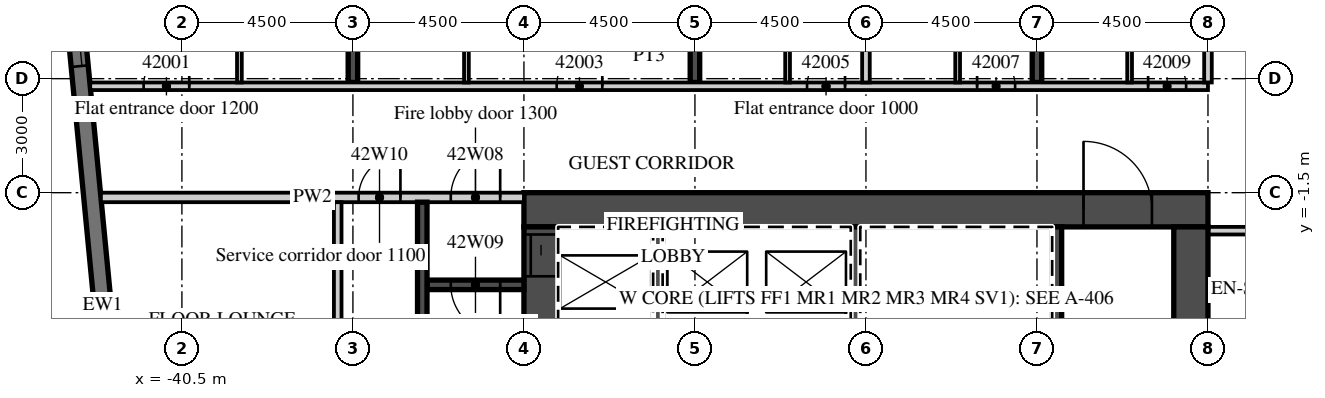
"""IFC4 building model, lengths in metres.
Left out: names, types, materials, properties, quantities, classifications, styles, units other than length and angle.
Written with IfcOpenShell. Run it as: python <this file> out.ifc"""

import sys

from ifc_helpers import new_model, si_unit, direction, frame, frame_2d, origin, place, context, subcontext, project, spatial, rectangle, extrude, element, fill, save


model = new_model("IFC4")
c1 = context("Model", 3, precision=1e-05, world=origin(), true_north=direction((0.0, 1.0)))
c2 = subcontext(c1, "Body", "Model", "MODEL_VIEW")
j1 = project(units=[si_unit("LENGTHUNIT", "METRE"), si_unit("PLANEANGLEUNIT", "RADIAN")], contexts=[c1])
p1 = place(None, origin())
s1 = spatial("IfcSite", under=j1, at=p1, CompositionType="ELEMENT")
p2 = place(p1, origin())
s2 = spatial("IfcBuilding", under=s1, at=p2, CompositionType="ELEMENT")
p3 = place(p2, frame((0.0, 0.0, 180.1)))
s3 = spatial("IfcBuildingStorey", under=s2, at=p3, CompositionType="ELEMENT", Elevation=180.1)
p4 = place(p3, frame((-36.0, 1.4, 0.0), z_axis=(0.0, 0.0, 1.0), x_axis=(0.0, 1.0, 0.0)))
e1 = element("IfcWall", 1, at=p4, inside=s3, PredefinedType="SHEAR", context=c2, shape_type="SweptSolid", body=[
    extrude(rectangle(XDim=15.401, YDim=0.25, at=frame_2d((7.701, 0.0))), origin(), (0.0, 0.0, 1.0), 3.3),
])
p5 = place(p3, frame((-27.0, 1.4, 0.0), z_axis=(0.0, 0.0, 1.0), x_axis=(0.0, 1.0, 0.0)))
e2 = element("IfcWall", 2, at=p5, inside=s3, PredefinedType="SHEAR", context=c2, shape_type="SweptSolid", body=[
    extrude(rectangle(XDim=16.268, YDim=0.25, at=frame_2d((8.134, 0.0))), origin(), (0.0, 0.0, 1.0), 3.3),
])
p6 = place(p3, frame((-18.0, 1.4, 0.0), z_axis=(0.0, 0.0, 1.0), x_axis=(0.0, 1.0, 0.0)))
e3 = element("IfcWall", 3, at=p6, inside=s3, PredefinedType="SHEAR", context=c2, shape_type="SweptSolid", body=[
    extrude(rectangle(XDim=17.134, YDim=0.25, at=frame_2d((8.567, 0.0))), origin(), (0.0, 0.0, 1.0), 3.3),
])
p7 = place(p3, frame((-44.214, 12.466, 0.0), z_axis=(0.0, 0.0, 1.0), x_axis=(0.095847314626, -0.995396047952, 0.0)))
e4 = element("IfcWall", 4, at=p7, inside=s3, PredefinedType="SOLIDWALL", context=c2, shape_type="SweptSolid", body=[
    extrude(rectangle(XDim=34.0, YDim=0.45, at=frame_2d((17.0, 0.0))), origin(), (0.0, 0.0, 1.0), 3.02),
])
p8 = place(p7, frame((2.865, 0.0, 0.45)))
e5 = element("IfcOpeningElement", 5, at=p8, cuts=e4, PredefinedType="OPENING", context=c2, shape_type="SweptSolid", body=[
    extrude(rectangle(XDim=3.3, YDim=2.25, at=frame_2d((1.65, 1.125))), frame((0.0, 0.235, 0.0), z_axis=(0.0, -1.0, 0.0), x_axis=(1.0, 0.0, 0.0)), (0.0, 0.0, 1.0), 0.47),
])
p9 = place(p7, frame((7.386, 0.0, 0.45)))
e6 = element("IfcOpeningElement", 6, at=p9, cuts=e4, PredefinedType="OPENING", context=c2, shape_type="SweptSolid", body=[
    extrude(rectangle(XDim=3.3, YDim=2.25, at=frame_2d((1.65, 1.125))), frame((0.0, 0.235, 0.0), z_axis=(0.0, -1.0, 0.0), x_axis=(1.0, 0.0, 0.0)), (0.0, 0.0, 1.0), 0.47),
])
p10 = place(p3, frame((-42.913, 1.3, 0.0), z_axis=(0.0, 0.0, 1.0), x_axis=(1.0, 0.0, 0.0)))
e7 = element("IfcWall", 7, at=p10, inside=s3, PredefinedType="PARTITIONING", context=c2, shape_type="SweptSolid", body=[
    extrude(rectangle(XDim=29.413, YDim=0.2, at=frame_2d((14.707, 0.0))), origin(), (0.0, 0.0, 1.0), 3.02),
])
p11 = place(p10, frame((1.406, 0.0, 0.0)))
e8 = element("IfcOpeningElement", 8, at=p11, cuts=e7, PredefinedType="OPENING", context=c2, shape_type="SweptSolid", body=[
    extrude(rectangle(XDim=1.2, YDim=2.1, at=frame_2d((0.6, 1.05))), frame((0.0, 0.11, 0.0), z_axis=(0.0, -1.0, 0.0), x_axis=(1.0, 0.0, 0.0)), (0.0, 0.0, 1.0), 0.22),
])
p12 = place(p10, frame((12.275, 0.0, 0.0)))
e9 = element("IfcOpeningElement", 9, at=p12, cuts=e7, PredefinedType="OPENING", context=c2, shape_type="SweptSolid", body=[
    extrude(rectangle(XDim=1.2, YDim=2.1, at=frame_2d((0.6, 1.05))), frame((0.0, 0.11, 0.0), z_axis=(0.0, -1.0, 0.0), x_axis=(1.0, 0.0, 0.0)), (0.0, 0.0, 1.0), 0.22),
])
p13 = place(p10, frame((18.863, 0.0, 0.0)))
e10 = element("IfcOpeningElement", 10, at=p13, cuts=e7, PredefinedType="OPENING", context=c2, shape_type="SweptSolid", body=[
    extrude(rectangle(XDim=1.0, YDim=2.1, at=frame_2d((0.5, 1.05))), frame((0.0, 0.11, 0.0), z_axis=(0.0, -1.0, 0.0), x_axis=(1.0, 0.0, 0.0)), (0.0, 0.0, 1.0), 0.22),
])
p14 = place(p10, frame((23.338, 0.0, 0.0)))
e11 = element("IfcOpeningElement", 11, at=p14, cuts=e7, PredefinedType="OPENING", context=c2, shape_type="SweptSolid", body=[
    extrude(rectangle(XDim=1.0, YDim=2.1, at=frame_2d((0.5, 1.05))), frame((0.0, 0.11, 0.0), z_axis=(0.0, -1.0, 0.0), x_axis=(1.0, 0.0, 0.0)), (0.0, 0.0, 1.0), 0.22),
])
p15 = place(p10, frame((27.838, 0.0, 0.0)))
e12 = element("IfcOpeningElement", 12, at=p15, cuts=e7, PredefinedType="OPENING", context=c2, shape_type="SweptSolid", body=[
    extrude(rectangle(XDim=1.0, YDim=2.1, at=frame_2d((0.5, 1.05))), frame((0.0, 0.11, 0.0), z_axis=(0.0, -1.0, 0.0), x_axis=(1.0, 0.0, 0.0)), (0.0, 0.0, 1.0), 0.22),
])
p16 = place(p3, frame((-38.987, 1.4, 0.0), z_axis=(0.0, 0.0, 1.0), x_axis=(0.0, 1.0, 0.0)))
e13 = element("IfcWall", 13, at=p16, inside=s3, PredefinedType="PARTITIONING", context=c2, shape_type="SweptSolid", body=[
    extrude(rectangle(XDim=4.028, YDim=0.125, at=frame_2d((2.014, 0.0))), origin(), (0.0, 0.0, 1.0), 3.02),
])
p17 = place(p16, frame((2.45, 0.0, 0.0)))
e14 = element("IfcOpeningElement", 14, at=p17, cuts=e13, PredefinedType="OPENING", context=c2, shape_type="SweptSolid", body=[
    extrude(rectangle(XDim=0.9, YDim=2.1, at=frame_2d((0.45, 1.05))), frame((0.0, 0.073, 0.0), z_axis=(0.0, -1.0, 0.0), x_axis=(1.0, 0.0, 0.0)), (0.0, 0.0, 1.0), 0.145),
])
p18 = place(p3, frame((-33.013, 1.4, 0.0), z_axis=(0.0, 0.0, 1.0), x_axis=(0.0, 1.0, 0.0)))
e15 = element("IfcWall", 15, at=p18, inside=s3, PredefinedType="PARTITIONING", context=c2, shape_type="SweptSolid", body=[
    extrude(rectangle(XDim=5.225, YDim=0.125, at=frame_2d((2.613, 0.0))), origin(), (0.0, 0.0, 1.0), 3.02),
])
p19 = place(p18, frame((2.45, 0.0, 0.0)))
e16 = element("IfcOpeningElement", 16, at=p19, cuts=e15, PredefinedType="OPENING", context=c2, shape_type="SweptSolid", body=[
    extrude(rectangle(XDim=0.9, YDim=2.1, at=frame_2d((0.45, 1.05))), frame((0.0, 0.073, 0.0), z_axis=(0.0, -1.0, 0.0), x_axis=(1.0, 0.0, 0.0)), (0.0, 0.0, 1.0), 0.145),
])
p20 = place(p3, frame((-22.5, 1.4, 0.0), z_axis=(0.0, 0.0, 1.0), x_axis=(0.0, 1.0, 0.0)))
e17 = element("IfcWall", 17, at=p20, inside=s3, PredefinedType="PARTITIONING", context=c2, shape_type="SweptSolid", body=[
    extrude(rectangle(XDim=16.723, YDim=0.2, at=frame_2d((8.362, 0.0))), origin(), (0.0, 0.0, 1.0), 3.02),
])
p21 = place(p3, frame((-24.562, 1.4, 0.0), z_axis=(0.0, 0.0, 1.0), x_axis=(0.0, 1.0, 0.0)))
e18 = element("IfcWall", 18, at=p21, inside=s3, PredefinedType="PARTITIONING", context=c2, shape_type="SweptSolid", body=[
    extrude(rectangle(XDim=5.225, YDim=0.125, at=frame_2d((2.613, 0.0))), origin(), (0.0, 0.0, 1.0), 3.02),
])
p22 = place(p21, frame((2.45, 0.0, 0.0)))
e19 = element("IfcOpeningElement", 19, at=p22, cuts=e18, PredefinedType="OPENING", context=c2, shape_type="SweptSolid", body=[
    extrude(rectangle(XDim=0.9, YDim=2.1, at=frame_2d((0.45, 1.05))), frame((0.0, 0.073, 0.0), z_axis=(0.0, -1.0, 0.0), x_axis=(1.0, 0.0, 0.0)), (0.0, 0.0, 1.0), 0.145),
])
p23 = place(p3, frame((-20.087, 1.4, 0.0), z_axis=(0.0, 0.0, 1.0), x_axis=(0.0, 1.0, 0.0)))
e20 = element("IfcWall", 20, at=p23, inside=s3, PredefinedType="PARTITIONING", context=c2, shape_type="SweptSolid", body=[
    extrude(rectangle(XDim=5.225, YDim=0.125, at=frame_2d((2.613, 0.0))), origin(), (0.0, 0.0, 1.0), 3.02),
])
p24 = place(p23, frame((2.45, 0.0, 0.0)))
e21 = element("IfcOpeningElement", 21, at=p24, cuts=e20, PredefinedType="OPENING", context=c2, shape_type="SweptSolid", body=[
    extrude(rectangle(XDim=0.9, YDim=2.1, at=frame_2d((0.45, 1.05))), frame((0.0, 0.073, 0.0), z_axis=(0.0, -1.0, 0.0), x_axis=(1.0, 0.0, 0.0)), (0.0, 0.0, 1.0), 0.145),
])
p25 = place(p3, frame((-13.5, 1.4, 0.0), z_axis=(0.0, 0.0, 1.0), x_axis=(0.0, 1.0, 0.0)))
e22 = element("IfcWall", 22, at=p25, inside=s3, PredefinedType="PARTITIONING", context=c2, shape_type="SweptSolid", body=[
    extrude(rectangle(XDim=17.59, YDim=0.2, at=frame_2d((8.795, 0.0))), origin(), (0.0, 0.0, 1.0), 3.02),
])
p26 = place(p3, frame((-15.562, 1.4, 0.0), z_axis=(0.0, 0.0, 1.0), x_axis=(0.0, 1.0, 0.0)))
e23 = element("IfcWall", 23, at=p26, inside=s3, PredefinedType="PARTITIONING", context=c2, shape_type="SweptSolid", body=[
    extrude(rectangle(XDim=5.225, YDim=0.125, at=frame_2d((2.613, 0.0))), origin(), (0.0, 0.0, 1.0), 3.02),
])
p27 = place(p26, frame((2.45, 0.0, 0.0)))
e24 = element("IfcOpeningElement", 24, at=p27, cuts=e23, PredefinedType="OPENING", context=c2, shape_type="SweptSolid", body=[
    extrude(rectangle(XDim=0.9, YDim=2.1, at=frame_2d((0.45, 1.05))), frame((0.0, 0.073, 0.0), z_axis=(0.0, -1.0, 0.0), x_axis=(1.0, 0.0, 0.0)), (0.0, 0.0, 1.0), 0.145),
])
p28 = place(p3, frame((-13.5, -2.5, 0.0), z_axis=(0.0, 0.0, 1.0), x_axis=(1.0, 0.0, 0.0)))
e25 = element("IfcWall", 25, at=p28, inside=s3, PredefinedType="PARTITIONING", context=c2, shape_type="SweptSolid", body=[
    extrude(rectangle(XDim=27.0, YDim=0.2, at=frame_2d((13.5, 0.0))), origin(), (0.0, 0.0, 1.0), 3.02),
])
p29 = place(p28, frame((2.925, 0.0, 0.0)))
e26 = element("IfcOpeningElement", 26, at=p29, cuts=e25, PredefinedType="OPENING", context=c2, shape_type="SweptSolid", body=[
    extrude(rectangle(XDim=1.0, YDim=2.1, at=frame_2d((0.5, 1.05))), frame((0.0, 0.11, 0.0), z_axis=(0.0, -1.0, 0.0), x_axis=(1.0, 0.0, 0.0)), (0.0, 0.0, 1.0), 0.22),
])
p30 = place(p28, frame((7.45, 0.0, 0.0)))
e27 = element("IfcOpeningElement", 27, at=p30, cuts=e25, PredefinedType="OPENING", context=c2, shape_type="SweptSolid", body=[
    extrude(rectangle(XDim=1.0, YDim=2.1, at=frame_2d((0.5, 1.05))), frame((0.0, 0.11, 0.0), z_axis=(0.0, -1.0, 0.0), x_axis=(1.0, 0.0, 0.0)), (0.0, 0.0, 1.0), 0.22),
])
p31 = place(p28, frame((11.925, 0.0, 0.0)))
e28 = element("IfcOpeningElement", 28, at=p31, cuts=e25, PredefinedType="OPENING", context=c2, shape_type="SweptSolid", body=[
    extrude(rectangle(XDim=1.0, YDim=2.1, at=frame_2d((0.5, 1.05))), frame((0.0, 0.11, 0.0), z_axis=(0.0, -1.0, 0.0), x_axis=(1.0, 0.0, 0.0)), (0.0, 0.0, 1.0), 0.22),
])
p32 = place(p28, frame((18.862, 0.0, 0.0)))
e29 = element("IfcOpeningElement", 29, at=p32, cuts=e25, PredefinedType="OPENING", context=c2, shape_type="SweptSolid", body=[
    extrude(rectangle(XDim=1.2, YDim=2.1, at=frame_2d((0.6, 1.05))), frame((0.0, 0.11, 0.0), z_axis=(0.0, -1.0, 0.0), x_axis=(1.0, 0.0, 0.0)), (0.0, 0.0, 1.0), 0.22),
])
p33 = place(p28, frame((25.425, 0.0, 0.0)))
e30 = element("IfcOpeningElement", 30, at=p33, cuts=e25, PredefinedType="OPENING", context=c2, shape_type="SweptSolid", body=[
    extrude(rectangle(XDim=1.0, YDim=2.1, at=frame_2d((0.5, 1.05))), frame((0.0, 0.11, 0.0), z_axis=(0.0, -1.0, 0.0), x_axis=(1.0, 0.0, 0.0)), (0.0, 0.0, 1.0), 0.22),
])
p34 = place(p3, frame((-31.5, -1.95, 0.0), z_axis=(0.0, 0.0, 1.0), x_axis=(1.0, 0.0, 0.0)))
e31 = element("IfcWall", 31, at=p34, inside=s3, PredefinedType="SHEAR", context=c2, shape_type="SweptSolid", body=[
    extrude(rectangle(XDim=18.0, YDim=0.9, at=frame_2d((9.0, 0.0))), origin(), (0.0, 0.0, 1.0), 3.02),
])
p35 = place(p34, frame((14.725, 0.0, 0.0)))
e32 = element("IfcOpeningElement", 32, at=p35, cuts=e31, PredefinedType="OPENING", context=c2, shape_type="SweptSolid", body=[
    extrude(rectangle(XDim=1.8, YDim=2.1, at=frame_2d((0.9, 1.05))), frame((0.0, 0.46, 0.0), z_axis=(0.0, -1.0, 0.0), x_axis=(1.0, 0.0, 0.0)), (0.0, 0.0, 1.0), 0.92),
])
p36 = place(p3, frame((-31.05, -15.2, 0.0), z_axis=(0.0, 0.0, 1.0), x_axis=(0.0, 1.0, 0.0)))
e33 = element("IfcWall", 33, at=p36, inside=s3, PredefinedType="SHEAR", context=c2, shape_type="SweptSolid", body=[
    extrude(rectangle(XDim=12.8, YDim=0.9, at=frame_2d((6.4, 0.0))), origin(), (0.0, 0.0, 1.0), 3.02),
])
p37 = place(p36, frame((11.5, 0.0, 0.0)))
e34 = element("IfcOpeningElement", 34, at=p37, cuts=e33, PredefinedType="OPENING", context=c2, shape_type="SweptSolid", body=[
    extrude(rectangle(XDim=1.1, YDim=2.1, at=frame_2d((0.55, 1.05))), frame((0.0, 0.46, 0.0), z_axis=(0.0, -1.0, 0.0), x_axis=(1.0, 0.0, 0.0)), (0.0, 0.0, 1.0), 0.92),
])
p38 = place(p3, frame((-13.95, -14.6, 0.0), z_axis=(0.0, 0.0, 1.0), x_axis=(0.0, 1.0, 0.0)))
e35 = element("IfcWall", 35, at=p38, inside=s3, PredefinedType="SHEAR", context=c2, shape_type="SweptSolid", body=[
    extrude(rectangle(XDim=12.2, YDim=0.9, at=frame_2d((6.1, 0.0))), origin(), (0.0, 0.0, 1.0), 3.02),
])
p39 = place(p3, frame((-17.475, -5.55, 0.0), z_axis=(0.0, 0.0, 1.0), x_axis=(0.0, 1.0, 0.0)))
e36 = element("IfcWall", 36, at=p39, inside=s3, PredefinedType="SHEAR", context=c2, shape_type="SweptSolid", body=[
    extrude(rectangle(XDim=3.15, YDim=0.25, at=frame_2d((1.575, 0.0))), origin(), (0.0, 0.0, 1.0), 3.02),
])
for number, where, z_axis, x_axis in (
    (37, (-27.975, -5.3, 0.0), (0.0, 0.0, 1.0), (0.0, 1.0, 0.0)),
    (38, (-22.775, -5.3, 0.0), (0.0, 0.0, 1.0), (0.0, 1.0, 0.0)),
):
    element("IfcWall", number, at=place(p3, frame(where, z_axis=z_axis, x_axis=x_axis)), inside=s3, PredefinedType="SHEAR", context=c2, shape_type="SweptSolid", body=[
        extrude(rectangle(XDim=2.9, YDim=0.25, at=frame_2d((1.45, 0.0))), origin(), (0.0, 0.0, 1.0), 3.02),
    ])
p40 = place(p3, frame((-42.632, -1.625, 0.0), z_axis=(0.0, 0.0, 1.0), x_axis=(1.0, 0.0, 0.0)))
e39 = element("IfcWall", 39, at=p40, inside=s3, PredefinedType="PARTITIONING", context=c2, shape_type="SweptSolid", body=[
    extrude(rectangle(XDim=11.132, YDim=0.25, at=frame_2d((5.566, 0.0))), origin(), (0.0, 0.0, 1.0), 3.02),
])
p41 = place(p40, frame((9.207, 0.0, 0.0)))
e40 = element("IfcOpeningElement", 40, at=p41, cuts=e39, PredefinedType="OPENING", context=c2, shape_type="SweptSolid", body=[
    extrude(rectangle(XDim=1.3, YDim=2.1, at=frame_2d((0.65, 1.05))), frame((0.0, 0.135, 0.0), z_axis=(0.0, -1.0, 0.0), x_axis=(1.0, 0.0, 0.0)), (0.0, 0.0, 1.0), 0.27),
])
p42 = place(p40, frame((6.781, 0.0, 0.0)))
e41 = element("IfcOpeningElement", 41, at=p42, cuts=e39, PredefinedType="OPENING", context=c2, shape_type="SweptSolid", body=[
    extrude(rectangle(XDim=1.1, YDim=2.1, at=frame_2d((0.55, 1.05))), frame((0.0, 0.135, 0.0), z_axis=(0.0, -1.0, 0.0), x_axis=(1.0, 0.0, 0.0)), (0.0, 0.0, 1.0), 0.27),
])
p43 = place(p3, frame((-34.05, -3.925, 0.0), z_axis=(0.0, 0.0, 1.0), x_axis=(1.0, 0.0, 0.0)))
e42 = element("IfcWall", 42, at=p43, inside=s3, PredefinedType="SHEAR", context=c2, shape_type="SweptSolid", body=[
    extrude(rectangle(XDim=2.55, YDim=0.25, at=frame_2d((1.275, 0.0))), origin(), (0.0, 0.0, 1.0), 3.02),
])
p44 = place(p43, frame((0.625, 0.0, 0.0)))
e43 = element("IfcOpeningElement", 43, at=p44, cuts=e42, PredefinedType="OPENING", context=c2, shape_type="SweptSolid", body=[
    extrude(rectangle(XDim=1.3, YDim=2.1, at=frame_2d((0.65, 1.05))), frame((0.0, 0.135, 0.0), z_axis=(0.0, -1.0, 0.0), x_axis=(1.0, 0.0, 0.0)), (0.0, 0.0, 1.0), 0.27),
])
p45 = place(p3, frame((-34.175, -10.1, 0.0), z_axis=(0.0, 0.0, 1.0), x_axis=(0.0, 1.0, 0.0)))
e44 = element("IfcWall", 44, at=p45, inside=s3, PredefinedType="SHEAR", context=c2, shape_type="SweptSolid", body=[
    extrude(rectangle(XDim=8.35, YDim=0.25, at=frame_2d((4.175, 0.0))), origin(), (0.0, 0.0, 1.0), 3.02),
])
p46 = place(p3, frame((-36.4, -17.7, 0.0), z_axis=(0.0, 0.0, 1.0), x_axis=(0.0, 1.0, 0.0)))
e45 = element("IfcWall", 45, at=p46, inside=s3, PredefinedType="PARTITIONING", context=c2, shape_type="SweptSolid", body=[
    extrude(rectangle(XDim=15.95, YDim=0.2, at=frame_2d((7.975, 0.0))), origin(), (0.0, 0.0, 1.0), 3.02),
])
p47 = place(p46, frame((0.35, 0.0, 0.0)))
e46 = element("IfcOpeningElement", 46, at=p47, cuts=e45, PredefinedType="OPENING", context=c2, shape_type="SweptSolid", body=[
    extrude(rectangle(XDim=0.9, YDim=2.1, at=frame_2d((0.45, 1.05))), frame((0.0, 0.11, 0.0), z_axis=(0.0, -1.0, 0.0), x_axis=(1.0, 0.0, 0.0)), (0.0, 0.0, 1.0), 0.22),
])
p48 = place(p9, origin())
e47 = element("IfcWindow", 47, at=p48, inside=s3, PartitioningType="SINGLE_PANEL", PredefinedType="WINDOW", context=c2, shape_type="SweptSolid", body=[
    extrude(rectangle(XDim=3.3, YDim=2.25, at=frame_2d((1.65, 1.125))), frame((0.0, 0.09, 0.0), z_axis=(0.0, -1.0, 0.0), x_axis=(1.0, 0.0, 0.0)), (0.0, 0.0, 1.0), 0.06),
])
fill(e6, e47)
p49 = place(p11, origin())
e48 = element("IfcDoor", 48, at=p49, inside=s3, OperationType="SINGLE_SWING_RIGHT", PredefinedType="DOOR", context=c2, shape_type="SweptSolid", body=[
    extrude(rectangle(XDim=1.2, YDim=2.1, at=frame_2d((0.6, 1.05))), frame((0.0, 0.025, 0.0), z_axis=(0.0, -1.0, 0.0), x_axis=(1.0, 0.0, 0.0)), (0.0, 0.0, 1.0), 0.05),
])
fill(e8, e48)
p50 = place(p12, origin())
e49 = element("IfcDoor", 49, at=p50, inside=s3, OperationType="SINGLE_SWING_RIGHT", PredefinedType="DOOR", context=c2, shape_type="SweptSolid", body=[
    extrude(rectangle(XDim=1.2, YDim=2.1, at=frame_2d((0.6, 1.05))), frame((0.0, 0.025, 0.0), z_axis=(0.0, -1.0, 0.0), x_axis=(1.0, 0.0, 0.0)), (0.0, 0.0, 1.0), 0.05),
])
fill(e9, e49)
p51 = place(p13, origin())
e50 = element("IfcDoor", 50, at=p51, inside=s3, OperationType="SINGLE_SWING_RIGHT", PredefinedType="DOOR", context=c2, shape_type="SweptSolid", body=[
    extrude(rectangle(XDim=1.0, YDim=2.1, at=frame_2d((0.5, 1.05))), frame((0.0, 0.025, 0.0), z_axis=(0.0, -1.0, 0.0), x_axis=(1.0, 0.0, 0.0)), (0.0, 0.0, 1.0), 0.05),
])
fill(e10, e50)
p52 = place(p14, origin())
e51 = element("IfcDoor", 51, at=p52, inside=s3, OperationType="SINGLE_SWING_LEFT", PredefinedType="DOOR", context=c2, shape_type="SweptSolid", body=[
    extrude(rectangle(XDim=1.0, YDim=2.1, at=frame_2d((0.5, 1.05))), frame((0.0, 0.025, 0.0), z_axis=(0.0, -1.0, 0.0), x_axis=(1.0, 0.0, 0.0)), (0.0, 0.0, 1.0), 0.05),
])
fill(e11, e51)
p53 = place(p15, origin())
e52 = element("IfcDoor", 52, at=p53, inside=s3, OperationType="SINGLE_SWING_LEFT", PredefinedType="DOOR", context=c2, shape_type="SweptSolid", body=[
    extrude(rectangle(XDim=1.0, YDim=2.1, at=frame_2d((0.5, 1.05))), frame((0.0, 0.025, 0.0), z_axis=(0.0, -1.0, 0.0), x_axis=(1.0, 0.0, 0.0)), (0.0, 0.0, 1.0), 0.05),
])
fill(e12, e52)
p54 = place(p37, origin())
e53 = element("IfcDoor", 53, at=p54, inside=s3, OperationType="SLIDING_TO_RIGHT", PredefinedType="DOOR", context=c2, shape_type="SweptSolid", body=[
    extrude(rectangle(XDim=1.1, YDim=2.1, at=frame_2d((0.55, 1.05))), frame((0.0, 0.025, 0.0), z_axis=(0.0, -1.0, 0.0), x_axis=(1.0, 0.0, 0.0)), (0.0, 0.0, 1.0), 0.05),
])
fill(e34, e53)
p55 = place(p35, origin())
e54 = element("IfcDoor", 54, at=p55, inside=s3, OperationType="DOUBLE_DOOR_DOUBLE_SWING", PredefinedType="DOOR", context=c2, shape_type="SweptSolid", body=[
    extrude(rectangle(XDim=1.8, YDim=2.1, at=frame_2d((0.9, 1.05))), frame((0.0, 0.025, 0.0), z_axis=(0.0, -1.0, 0.0), x_axis=(1.0, 0.0, 0.0)), (0.0, 0.0, 1.0), 0.05),
])
fill(e32, e54)
p56 = place(p41, origin())
e55 = element("IfcDoor", 55, at=p56, inside=s3, OperationType="SINGLE_SWING_RIGHT", PredefinedType="DOOR", context=c2, shape_type="SweptSolid", body=[
    extrude(rectangle(XDim=1.3, YDim=2.1, at=frame_2d((0.65, 1.05))), frame((0.0, 0.025, 0.0), z_axis=(0.0, -1.0, 0.0), x_axis=(1.0, 0.0, 0.0)), (0.0, 0.0, 1.0), 0.05),
])
fill(e40, e55)
p57 = place(p44, origin())
e56 = element("IfcDoor", 56, at=p57, inside=s3, OperationType="SINGLE_SWING_RIGHT", PredefinedType="DOOR", context=c2, shape_type="SweptSolid", body=[
    extrude(rectangle(XDim=1.3, YDim=2.1, at=frame_2d((0.65, 1.05))), frame((0.0, 0.025, 0.0), z_axis=(0.0, -1.0, 0.0), x_axis=(1.0, 0.0, 0.0)), (0.0, 0.0, 1.0), 0.05),
])
fill(e43, e56)
p58 = place(p42, origin())
e57 = element("IfcDoor", 57, at=p58, inside=s3, OperationType="SINGLE_SWING_RIGHT", PredefinedType="DOOR", context=c2, shape_type="SweptSolid", body=[
    extrude(rectangle(XDim=1.1, YDim=2.1, at=frame_2d((0.55, 1.05))), frame((0.0, 0.025, 0.0), z_axis=(0.0, -1.0, 0.0), x_axis=(1.0, 0.0, 0.0)), (0.0, 0.0, 1.0), 0.05),
])
fill(e41, e57)
save(model, sys.argv[1])
